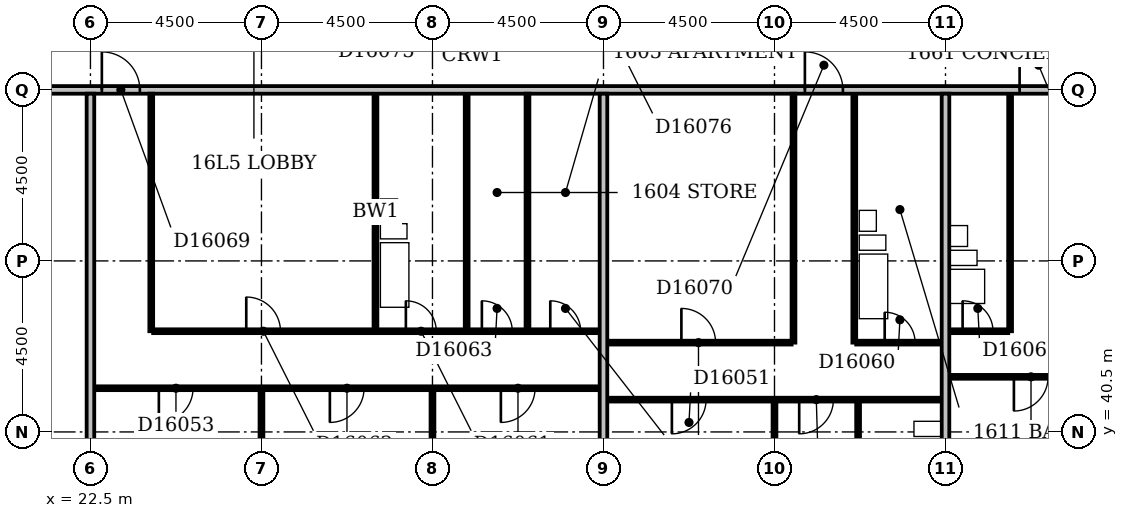
"""IFC4 building model, lengths in metres.
Left out: names, types, materials, properties, quantities, classifications, styles, units other than length and angle.
Written with IfcOpenShell. Run it as: python <this file> out.ifc"""

import sys

from ifc_helpers import new_model, si_unit, direction, frame, frame_2d, origin, place, context, subcontext, project, spatial, rectangle, extrude, element, fill, save


model = new_model("IFC4")
c1 = context("Model", 3, precision=1e-05, world=origin(), true_north=direction((0.0, 1.0)))
c2 = subcontext(c1, "Body", "Model", "MODEL_VIEW")
j1 = project(units=[si_unit("LENGTHUNIT", "METRE"), si_unit("PLANEANGLEUNIT", "RADIAN")], contexts=[c1])
p1 = place(None, origin())
s1 = spatial("IfcSite", under=j1, at=p1, CompositionType="ELEMENT")
p2 = place(p1, origin())
s2 = spatial("IfcBuilding", under=s1, at=p2, CompositionType="ELEMENT")
p3 = place(p2, frame((0.0, 0.0, 68.6)))
s3 = spatial("IfcBuildingStorey", under=s2, at=p3, CompositionType="ELEMENT", Elevation=68.6)
p4 = place(p3, frame((22.5, 36.6, 0.0), z_axis=(0.0, 0.0, 1.0), x_axis=(0.0, 1.0, 0.0)))
e1 = element("IfcWall", 1, at=p4, inside=s3, PredefinedType="PARTITIONING", context=c2, shape_type="SweptSolid", body=[
    extrude(rectangle(XDim=12.8, YDim=0.2, at=frame_2d((6.4, 0.0))), origin(), (0.0, 0.0, 1.0), 3.3),
])
p5 = place(p3, frame((27.0, 36.6, 0.0), z_axis=(0.0, 0.0, 1.0), x_axis=(0.0, 1.0, 0.0)))
e2 = element("IfcWall", 2, at=p5, inside=s3, PredefinedType="PARTITIONING", context=c2, shape_type="SweptSolid", body=[
    extrude(rectangle(XDim=5.0, YDim=0.1, at=frame_2d((2.5, 0.0))), origin(), (0.0, 0.0, 1.0), 2.6),
])
p6 = place(p3, frame((31.5, 36.6, 0.0), z_axis=(0.0, 0.0, 1.0), x_axis=(0.0, 1.0, 0.0)))
e3 = element("IfcWall", 3, at=p6, inside=s3, PredefinedType="PARTITIONING", context=c2, shape_type="SweptSolid", body=[
    extrude(rectangle(XDim=5.0, YDim=0.1, at=frame_2d((2.5, 0.0))), origin(), (0.0, 0.0, 1.0), 3.3),
])
p7 = place(p3, frame((36.0, 36.6, 0.0), z_axis=(0.0, 0.0, 1.0), x_axis=(0.0, 1.0, 0.0)))
e4 = element("IfcWall", 4, at=p7, inside=s3, PredefinedType="PARTITIONING", context=c2, shape_type="SweptSolid", body=[
    extrude(rectangle(XDim=12.8, YDim=0.2, at=frame_2d((6.4, 0.0))), origin(), (0.0, 0.0, 1.0), 2.4),
])
p8 = place(p3, frame((40.5, 36.6, 0.0), z_axis=(0.0, 0.0, 1.0), x_axis=(0.0, 1.0, 0.0)))
e5 = element("IfcWall", 5, at=p8, inside=s3, PredefinedType="PARTITIONING", context=c2, shape_type="SweptSolid", body=[
    extrude(rectangle(XDim=4.7, YDim=0.1, at=frame_2d((2.35, 0.0))), origin(), (0.0, 0.0, 1.0), 3.3),
])
p9 = place(p3, frame((45.0, 36.6, 0.0), z_axis=(0.0, 0.0, 1.0), x_axis=(0.0, 1.0, 0.0)))
e6 = element("IfcWall", 6, at=p9, inside=s3, PredefinedType="PARTITIONING", context=c2, shape_type="SweptSolid", body=[
    extrude(rectangle(XDim=12.8, YDim=0.2, at=frame_2d((6.4, 0.0))), origin(), (0.0, 0.0, 1.0), 2.6),
])
p10 = place(p3, frame((42.7, 38.45, 0.0), z_axis=(0.0, 0.0, 1.0), x_axis=(0.0, 1.0, 0.0)))
e7 = element("IfcWall", 7, at=p10, inside=s3, PredefinedType="PLUMBINGWALL", context=c2, shape_type="SweptSolid", body=[
    extrude(rectangle(XDim=2.85, YDim=0.1, at=frame_2d((1.425, 0.0))), origin(), (0.0, 0.0, 1.0), 3.3),
])
p11 = place(p10, frame((1.05, 0.0, 0.0)))
e8 = element("IfcOpeningElement", 8, at=p11, cuts=e7, PredefinedType="OPENING", context=c2, shape_type="SweptSolid", body=[
    extrude(rectangle(XDim=0.8, YDim=2.1, at=frame_2d((0.4, 1.05))), frame((0.0, 0.062, 0.0), z_axis=(0.0, -1.0, 0.0), x_axis=(1.0, 0.0, 0.0)), (0.0, 0.0, 1.0), 0.124),
])
p12 = place(p3, frame((36.1, 41.35, 0.0), z_axis=(0.0, 0.0, 1.0), x_axis=(1.0, 0.0, 0.0)))
e9 = element("IfcWall", 9, at=p12, inside=s3, PredefinedType="PARTITIONING", context=c2, shape_type="SweptSolid", body=[
    extrude(rectangle(XDim=8.8, YDim=0.1, at=frame_2d((4.4, 0.0))), origin(), (0.0, 0.0, 1.0), 3.3),
])
p13 = place(p12, frame((1.7, 0.0, 0.0)))
e10 = element("IfcOpeningElement", 10, at=p13, cuts=e9, PredefinedType="OPENING", context=c2, shape_type="SweptSolid", body=[
    extrude(rectangle(XDim=0.9, YDim=2.1, at=frame_2d((0.45, 1.05))), frame((0.0, 0.062, 0.0), z_axis=(0.0, -1.0, 0.0), x_axis=(1.0, 0.0, 0.0)), (0.0, 0.0, 1.0), 0.124),
])
p14 = place(p12, frame((5.05, 0.0, 0.0)))
e11 = element("IfcOpeningElement", 11, at=p14, cuts=e9, PredefinedType="OPENING", context=c2, shape_type="SweptSolid", body=[
    extrude(rectangle(XDim=0.9, YDim=2.1, at=frame_2d((0.45, 1.05))), frame((0.0, 0.062, 0.0), z_axis=(0.0, -1.0, 0.0), x_axis=(1.0, 0.0, 0.0)), (0.0, 0.0, 1.0), 0.124),
])
p15 = place(p3, frame((22.6, 41.65, 0.0), z_axis=(0.0, 0.0, 1.0), x_axis=(1.0, 0.0, 0.0)))
e12 = element("IfcWall", 12, at=p15, inside=s3, PredefinedType="PARTITIONING", context=c2, shape_type="SweptSolid", body=[
    extrude(rectangle(XDim=13.3, YDim=0.1, at=frame_2d((6.65, 0.0))), origin(), (0.0, 0.0, 1.0), 3.3),
])
p16 = place(p15, frame((1.7, 0.0, 0.0)))
e13 = element("IfcOpeningElement", 13, at=p16, cuts=e12, PredefinedType="OPENING", context=c2, shape_type="SweptSolid", body=[
    extrude(rectangle(XDim=0.9, YDim=2.1, at=frame_2d((0.45, 1.05))), frame((0.0, 0.062, 0.0), z_axis=(0.0, -1.0, 0.0), x_axis=(1.0, 0.0, 0.0)), (0.0, 0.0, 1.0), 0.124),
])
p17 = place(p15, frame((6.2, 0.0, 0.0)))
e14 = element("IfcOpeningElement", 14, at=p17, cuts=e12, PredefinedType="OPENING", context=c2, shape_type="SweptSolid", body=[
    extrude(rectangle(XDim=0.9, YDim=2.1, at=frame_2d((0.45, 1.05))), frame((0.0, 0.062, 0.0), z_axis=(0.0, -1.0, 0.0), x_axis=(1.0, 0.0, 0.0)), (0.0, 0.0, 1.0), 0.124),
])
p18 = place(p15, frame((10.7, 0.0, 0.0)))
e15 = element("IfcOpeningElement", 15, at=p18, cuts=e12, PredefinedType="OPENING", context=c2, shape_type="SweptSolid", body=[
    extrude(rectangle(XDim=0.9, YDim=2.1, at=frame_2d((0.45, 1.05))), frame((0.0, 0.062, 0.0), z_axis=(0.0, -1.0, 0.0), x_axis=(1.0, 0.0, 0.0)), (0.0, 0.0, 1.0), 0.124),
])
p19 = place(p3, frame((45.1, 41.95, 0.0), z_axis=(0.0, 0.0, 1.0), x_axis=(1.0, 0.0, 0.0)))
e16 = element("IfcWall", 16, at=p19, inside=s3, PredefinedType="PARTITIONING", context=c2, shape_type="SweptSolid", body=[
    extrude(rectangle(XDim=4.3, YDim=0.1, at=frame_2d((2.15, 0.0))), origin(), (0.0, 0.0, 1.0), 3.3),
])
p20 = place(p19, frame((1.7, 0.0, 0.0)))
e17 = element("IfcOpeningElement", 17, at=p20, cuts=e16, PredefinedType="OPENING", context=c2, shape_type="SweptSolid", body=[
    extrude(rectangle(XDim=0.9, YDim=2.1, at=frame_2d((0.45, 1.05))), frame((0.0, 0.062, 0.0), z_axis=(0.0, -1.0, 0.0), x_axis=(1.0, 0.0, 0.0)), (0.0, 0.0, 1.0), 0.124),
])
p21 = place(p3, frame((36.1, 42.85, 0.0), z_axis=(0.0, 0.0, 1.0), x_axis=(1.0, 0.0, 0.0)))
e18 = element("IfcWall", 18, at=p21, inside=s3, PredefinedType="PARTITIONING", context=c2, shape_type="SweptSolid", body=[
    extrude(rectangle(XDim=4.85, YDim=0.1, at=frame_2d((2.425, 0.0))), origin(), (0.0, 0.0, 1.0), 3.3),
])
p22 = place(p21, frame((1.95, 0.0, 0.0)))
e19 = element("IfcOpeningElement", 19, at=p22, cuts=e18, PredefinedType="OPENING", context=c2, shape_type="SweptSolid", body=[
    extrude(rectangle(XDim=0.9, YDim=2.1, at=frame_2d((0.45, 1.05))), frame((0.0, 0.062, 0.0), z_axis=(0.0, -1.0, 0.0), x_axis=(1.0, 0.0, 0.0)), (0.0, 0.0, 1.0), 0.124),
])
p23 = place(p3, frame((41.0, 42.85, 0.0), z_axis=(0.0, 0.0, 1.0), x_axis=(0.0, 1.0, 0.0)))
e20 = element("IfcWall", 20, at=p23, inside=s3, PredefinedType="PARTITIONING", context=c2, shape_type="SweptSolid", body=[
    extrude(rectangle(XDim=6.55, YDim=0.1, at=frame_2d((3.275, 0.0))), origin(), (0.0, 0.0, 1.0), 3.3),
])
p24 = place(p3, frame((42.6, 42.85, 0.0), z_axis=(0.0, 0.0, 1.0), x_axis=(0.0, 1.0, 0.0)))
e21 = element("IfcWall", 21, at=p24, inside=s3, PredefinedType="PLUMBINGWALL", context=c2, shape_type="SweptSolid", body=[
    extrude(rectangle(XDim=6.55, YDim=0.1, at=frame_2d((3.275, 0.0))), origin(), (0.0, 0.0, 1.0), 3.3),
])
p25 = place(p3, frame((42.65, 42.85, 0.0), z_axis=(0.0, 0.0, 1.0), x_axis=(1.0, 0.0, 0.0)))
e22 = element("IfcWall", 22, at=p25, inside=s3, PredefinedType="PARTITIONING", context=c2, shape_type="SweptSolid", body=[
    extrude(rectangle(XDim=2.25, YDim=0.1, at=frame_2d((1.125, 0.0))), origin(), (0.0, 0.0, 1.0), 3.3),
])
p26 = place(p25, frame((0.75, 0.0, 0.0)))
e23 = element("IfcOpeningElement", 23, at=p26, cuts=e22, PredefinedType="OPENING", context=c2, shape_type="SweptSolid", body=[
    extrude(rectangle(XDim=0.8, YDim=2.1, at=frame_2d((0.4, 1.05))), frame((0.0, 0.062, 0.0), z_axis=(0.0, -1.0, 0.0), x_axis=(1.0, 0.0, 0.0)), (0.0, 0.0, 1.0), 0.124),
])
p27 = place(p3, frame((24.1, 43.15, 0.0), z_axis=(0.0, 0.0, 1.0), x_axis=(0.0, 1.0, 0.0)))
e24 = element("IfcWall", 24, at=p27, inside=s3, PredefinedType="PARTITIONING", context=c2, shape_type="SweptSolid", body=[
    extrude(rectangle(XDim=6.25, YDim=0.1, at=frame_2d((3.125, 0.0))), origin(), (0.0, 0.0, 1.0), 3.3),
])
p28 = place(p3, frame((24.15, 43.15, 0.0), z_axis=(0.0, 0.0, 1.0), x_axis=(1.0, 0.0, 0.0)))
e25 = element("IfcWall", 25, at=p28, inside=s3, PredefinedType="PARTITIONING", context=c2, shape_type="SweptSolid", body=[
    extrude(rectangle(XDim=11.75, YDim=0.1, at=frame_2d((5.875, 0.0))), origin(), (0.0, 0.0, 1.0), 3.3),
])
p29 = place(p28, frame((6.65, 0.0, 0.0)))
e26 = element("IfcOpeningElement", 26, at=p29, cuts=e25, PredefinedType="OPENING", context=c2, shape_type="SweptSolid", body=[
    extrude(rectangle(XDim=0.8, YDim=2.1, at=frame_2d((0.4, 1.05))), frame((0.0, 0.062, 0.0), z_axis=(0.0, -1.0, 0.0), x_axis=(1.0, 0.0, 0.0)), (0.0, 0.0, 1.0), 0.124),
])
p30 = place(p28, frame((2.45, 0.0, 0.0)))
e27 = element("IfcOpeningElement", 27, at=p30, cuts=e25, PredefinedType="OPENING", context=c2, shape_type="SweptSolid", body=[
    extrude(rectangle(XDim=0.9, YDim=2.1, at=frame_2d((0.45, 1.05))), frame((0.0, 0.062, 0.0), z_axis=(0.0, -1.0, 0.0), x_axis=(1.0, 0.0, 0.0)), (0.0, 0.0, 1.0), 0.124),
])
p31 = place(p28, frame((8.65, 0.0, 0.0)))
e28 = element("IfcOpeningElement", 28, at=p31, cuts=e25, PredefinedType="OPENING", context=c2, shape_type="SweptSolid", body=[
    extrude(rectangle(XDim=0.8, YDim=2.1, at=frame_2d((0.4, 1.05))), frame((0.0, 0.062, 0.0), z_axis=(0.0, -1.0, 0.0), x_axis=(1.0, 0.0, 0.0)), (0.0, 0.0, 1.0), 0.124),
])
p32 = place(p28, frame((10.45, 0.0, 0.0)))
e29 = element("IfcOpeningElement", 29, at=p32, cuts=e25, PredefinedType="OPENING", context=c2, shape_type="SweptSolid", body=[
    extrude(rectangle(XDim=0.8, YDim=2.1, at=frame_2d((0.4, 1.05))), frame((0.0, 0.062, 0.0), z_axis=(0.0, -1.0, 0.0), x_axis=(1.0, 0.0, 0.0)), (0.0, 0.0, 1.0), 0.124),
])
p33 = place(p3, frame((45.1, 43.15, 0.0), z_axis=(0.0, 0.0, 1.0), x_axis=(1.0, 0.0, 0.0)))
e30 = element("IfcWall", 30, at=p33, inside=s3, PredefinedType="PARTITIONING", context=c2, shape_type="SweptSolid", body=[
    extrude(rectangle(XDim=1.55, YDim=0.1, at=frame_2d((0.775, 0.0))), origin(), (0.0, 0.0, 1.0), 3.3),
])
p34 = place(p33, frame((0.35, 0.0, 0.0)))
e31 = element("IfcOpeningElement", 31, at=p34, cuts=e30, PredefinedType="OPENING", context=c2, shape_type="SweptSolid", body=[
    extrude(rectangle(XDim=0.8, YDim=2.1, at=frame_2d((0.4, 1.05))), frame((0.0, 0.062, 0.0), z_axis=(0.0, -1.0, 0.0), x_axis=(1.0, 0.0, 0.0)), (0.0, 0.0, 1.0), 0.124),
])
p35 = place(p3, frame((46.7, 43.15, 0.0), z_axis=(0.0, 0.0, 1.0), x_axis=(0.0, 1.0, 0.0)))
e32 = element("IfcWall", 32, at=p35, inside=s3, PredefinedType="PLUMBINGWALL", context=c2, shape_type="SweptSolid", body=[
    extrude(rectangle(XDim=6.25, YDim=0.1, at=frame_2d((3.125, 0.0))), origin(), (0.0, 0.0, 1.0), 3.3),
])
for number, where, z_axis, x_axis in (
    (33, (30.0, 43.2, 0.0), (0.0, 0.0, 1.0), (0.0, 1.0, 0.0)),
    (34, (32.4, 43.2, 0.0), (0.0, 0.0, 1.0), (0.0, 1.0, 0.0)),
):
    element("IfcWall", number, at=place(p3, frame(where, z_axis=z_axis, x_axis=x_axis)), inside=s3, PredefinedType="PLUMBINGWALL", context=c2, shape_type="SweptSolid", body=[
        extrude(rectangle(XDim=6.2, YDim=0.1, at=frame_2d((3.1, 0.0))), origin(), (0.0, 0.0, 1.0), 3.3),
    ])
p36 = place(p3, frame((34.0, 43.2, 0.0), z_axis=(0.0, 0.0, 1.0), x_axis=(0.0, 1.0, 0.0)))
e35 = element("IfcWall", 35, at=p36, inside=s3, PredefinedType="PARTITIONING", context=c2, shape_type="SweptSolid", body=[
    extrude(rectangle(XDim=6.2, YDim=0.1, at=frame_2d((3.1, 0.0))), origin(), (0.0, 0.0, 1.0), 3.3),
])
p37 = place(p3, frame((9.1, 49.5, 0.0), z_axis=(0.0, 0.0, 1.0), x_axis=(1.0, 0.0, 0.0)))
e36 = element("IfcWall", 36, at=p37, inside=s3, PredefinedType="PARTITIONING", context=c2, shape_type="SweptSolid", body=[
    extrude(rectangle(XDim=57.8, YDim=0.2, at=frame_2d((28.9, 0.0))), origin(), (0.0, 0.0, 1.0), 3.3),
])
p38 = place(p37, frame((13.7, 0.0, 0.0)))
e37 = element("IfcOpeningElement", 37, at=p38, cuts=e36, PredefinedType="OPENING", context=c2, shape_type="SweptSolid", body=[
    extrude(rectangle(XDim=1.0, YDim=2.1, at=frame_2d((0.5, 1.05))), frame((0.0, 0.112, 0.0), z_axis=(0.0, -1.0, 0.0), x_axis=(1.0, 0.0, 0.0)), (0.0, 0.0, 1.0), 0.224),
])
p39 = place(p37, frame((32.2, 0.0, 0.0)))
e38 = element("IfcOpeningElement", 38, at=p39, cuts=e36, PredefinedType="OPENING", context=c2, shape_type="SweptSolid", body=[
    extrude(rectangle(XDim=1.0, YDim=2.1, at=frame_2d((0.5, 1.05))), frame((0.0, 0.112, 0.0), z_axis=(0.0, -1.0, 0.0), x_axis=(1.0, 0.0, 0.0)), (0.0, 0.0, 1.0), 0.224),
])
p40 = place(p37, frame((37.85, 0.0, 0.0)))
e39 = element("IfcOpeningElement", 39, at=p40, cuts=e36, PredefinedType="OPENING", context=c2, shape_type="SweptSolid", body=[
    extrude(rectangle(XDim=1.0, YDim=2.1, at=frame_2d((0.5, 1.05))), frame((0.0, 0.112, 0.0), z_axis=(0.0, -1.0, 0.0), x_axis=(1.0, 0.0, 0.0)), (0.0, 0.0, 1.0), 0.224),
])
p41 = place(p37, frame((45.7, 0.0, 0.0)))
e40 = element("IfcOpeningElement", 40, at=p41, cuts=e36, PredefinedType="OPENING", context=c2, shape_type="SweptSolid", body=[
    extrude(rectangle(XDim=1.0, YDim=2.1, at=frame_2d((0.5, 1.05))), frame((0.0, 0.112, 0.0), z_axis=(0.0, -1.0, 0.0), x_axis=(1.0, 0.0, 0.0)), (0.0, 0.0, 1.0), 0.224),
])
p42 = place(p37, frame((49.7, 0.0, 0.0)))
e41 = element("IfcOpeningElement", 41, at=p42, cuts=e36, PredefinedType="OPENING", context=c2, shape_type="SweptSolid", body=[
    extrude(rectangle(XDim=1.0, YDim=2.1, at=frame_2d((0.5, 1.05))), frame((0.0, 0.112, 0.0), z_axis=(0.0, -1.0, 0.0), x_axis=(1.0, 0.0, 0.0)), (0.0, 0.0, 1.0), 0.224),
])
p43 = place(p37, frame((8.4, 0.0, 0.0)))
e42 = element("IfcOpeningElement", 42, at=p43, cuts=e36, PredefinedType="OPENING", context=c2, shape_type="SweptSolid", body=[
    extrude(rectangle(XDim=0.9, YDim=2.1, at=frame_2d((0.45, 1.05))), frame((0.0, 0.112, 0.0), z_axis=(0.0, -1.0, 0.0), x_axis=(1.0, 0.0, 0.0)), (0.0, 0.0, 1.0), 0.224),
])
p44 = place(p13, frame((0.9, 0.0, 0.0), z_axis=(0.0, 0.0, 1.0), x_axis=(-1.0, 0.0, 0.0)))
e43 = element("IfcDoor", 43, at=p44, inside=s3, OperationType="SINGLE_SWING_RIGHT", PredefinedType="DOOR", context=c2, shape_type="SweptSolid", body=[
    extrude(rectangle(XDim=0.9, YDim=2.1, at=frame_2d((0.45, 1.05))), frame((0.0, 0.025, 0.0), z_axis=(0.0, -1.0, 0.0), x_axis=(1.0, 0.0, 0.0)), (0.0, 0.0, 1.0), 0.05),
])
fill(e10, e43)
p45 = place(p14, frame((0.9, 0.0, 0.0), z_axis=(0.0, 0.0, 1.0), x_axis=(-1.0, 0.0, 0.0)))
e44 = element("IfcDoor", 44, at=p45, inside=s3, OperationType="SINGLE_SWING_RIGHT", PredefinedType="DOOR", context=c2, shape_type="SweptSolid", body=[
    extrude(rectangle(XDim=0.9, YDim=2.1, at=frame_2d((0.45, 1.05))), frame((0.0, 0.025, 0.0), z_axis=(0.0, -1.0, 0.0), x_axis=(1.0, 0.0, 0.0)), (0.0, 0.0, 1.0), 0.05),
])
fill(e11, e44)
p46 = place(p16, frame((0.9, 0.0, 0.0), z_axis=(0.0, 0.0, 1.0), x_axis=(-1.0, 0.0, 0.0)))
e45 = element("IfcDoor", 45, at=p46, inside=s3, OperationType="SINGLE_SWING_RIGHT", PredefinedType="DOOR", context=c2, shape_type="SweptSolid", body=[
    extrude(rectangle(XDim=0.9, YDim=2.1, at=frame_2d((0.45, 1.05))), frame((0.0, 0.025, 0.0), z_axis=(0.0, -1.0, 0.0), x_axis=(1.0, 0.0, 0.0)), (0.0, 0.0, 1.0), 0.05),
])
fill(e13, e45)
p47 = place(p17, frame((0.9, 0.0, 0.0), z_axis=(0.0, 0.0, 1.0), x_axis=(-1.0, 0.0, 0.0)))
e46 = element("IfcDoor", 46, at=p47, inside=s3, OperationType="SINGLE_SWING_RIGHT", PredefinedType="DOOR", context=c2, shape_type="SweptSolid", body=[
    extrude(rectangle(XDim=0.9, YDim=2.1, at=frame_2d((0.45, 1.05))), frame((0.0, 0.025, 0.0), z_axis=(0.0, -1.0, 0.0), x_axis=(1.0, 0.0, 0.0)), (0.0, 0.0, 1.0), 0.05),
])
fill(e14, e46)
p48 = place(p18, frame((0.9, 0.0, 0.0), z_axis=(0.0, 0.0, 1.0), x_axis=(-1.0, 0.0, 0.0)))
e47 = element("IfcDoor", 47, at=p48, inside=s3, OperationType="SINGLE_SWING_RIGHT", PredefinedType="DOOR", context=c2, shape_type="SweptSolid", body=[
    extrude(rectangle(XDim=0.9, YDim=2.1, at=frame_2d((0.45, 1.05))), frame((0.0, 0.025, 0.0), z_axis=(0.0, -1.0, 0.0), x_axis=(1.0, 0.0, 0.0)), (0.0, 0.0, 1.0), 0.05),
])
fill(e15, e47)
p49 = place(p20, frame((0.9, 0.0, 0.0), z_axis=(0.0, 0.0, 1.0), x_axis=(-1.0, 0.0, 0.0)))
e48 = element("IfcDoor", 48, at=p49, inside=s3, OperationType="SINGLE_SWING_RIGHT", PredefinedType="DOOR", context=c2, shape_type="SweptSolid", body=[
    extrude(rectangle(XDim=0.9, YDim=2.1, at=frame_2d((0.45, 1.05))), frame((0.0, 0.025, 0.0), z_axis=(0.0, -1.0, 0.0), x_axis=(1.0, 0.0, 0.0)), (0.0, 0.0, 1.0), 0.05),
])
fill(e17, e48)
p50 = place(p22, origin())
e49 = element("IfcDoor", 49, at=p50, inside=s3, OperationType="SINGLE_SWING_LEFT", PredefinedType="DOOR", context=c2, shape_type="SweptSolid", body=[
    extrude(rectangle(XDim=0.9, YDim=2.1, at=frame_2d((0.45, 1.05))), frame((0.0, 0.025, 0.0), z_axis=(0.0, -1.0, 0.0), x_axis=(1.0, 0.0, 0.0)), (0.0, 0.0, 1.0), 0.05),
])
fill(e19, e49)
p51 = place(p26, origin())
e50 = element("IfcDoor", 50, at=p51, inside=s3, OperationType="SINGLE_SWING_LEFT", PredefinedType="DOOR", context=c2, shape_type="SweptSolid", body=[
    extrude(rectangle(XDim=0.8, YDim=2.1, at=frame_2d((0.4, 1.05))), frame((0.0, 0.025, 0.0), z_axis=(0.0, -1.0, 0.0), x_axis=(1.0, 0.0, 0.0)), (0.0, 0.0, 1.0), 0.05),
])
fill(e23, e50)
p52 = place(p29, origin())
e51 = element("IfcDoor", 51, at=p52, inside=s3, OperationType="SINGLE_SWING_LEFT", PredefinedType="DOOR", context=c2, shape_type="SweptSolid", body=[
    extrude(rectangle(XDim=0.8, YDim=2.1, at=frame_2d((0.4, 1.05))), frame((0.0, 0.025, 0.0), z_axis=(0.0, -1.0, 0.0), x_axis=(1.0, 0.0, 0.0)), (0.0, 0.0, 1.0), 0.05),
])
fill(e26, e51)
p53 = place(p30, origin())
e52 = element("IfcDoor", 52, at=p53, inside=s3, OperationType="SINGLE_SWING_LEFT", PredefinedType="DOOR", context=c2, shape_type="SweptSolid", body=[
    extrude(rectangle(XDim=0.9, YDim=2.1, at=frame_2d((0.45, 1.05))), frame((0.0, 0.025, 0.0), z_axis=(0.0, -1.0, 0.0), x_axis=(1.0, 0.0, 0.0)), (0.0, 0.0, 1.0), 0.05),
])
fill(e27, e52)
p54 = place(p31, origin())
e53 = element("IfcDoor", 53, at=p54, inside=s3, OperationType="SINGLE_SWING_LEFT", PredefinedType="DOOR", context=c2, shape_type="SweptSolid", body=[
    extrude(rectangle(XDim=0.8, YDim=2.1, at=frame_2d((0.4, 1.05))), frame((0.0, 0.025, 0.0), z_axis=(0.0, -1.0, 0.0), x_axis=(1.0, 0.0, 0.0)), (0.0, 0.0, 1.0), 0.05),
])
fill(e28, e53)
p55 = place(p32, origin())
e54 = element("IfcDoor", 54, at=p55, inside=s3, OperationType="SINGLE_SWING_LEFT", PredefinedType="DOOR", context=c2, shape_type="SweptSolid", body=[
    extrude(rectangle(XDim=0.8, YDim=2.1, at=frame_2d((0.4, 1.05))), frame((0.0, 0.025, 0.0), z_axis=(0.0, -1.0, 0.0), x_axis=(1.0, 0.0, 0.0)), (0.0, 0.0, 1.0), 0.05),
])
fill(e29, e54)
p56 = place(p34, origin())
e55 = element("IfcDoor", 55, at=p56, inside=s3, OperationType="SINGLE_SWING_LEFT", PredefinedType="DOOR", context=c2, shape_type="SweptSolid", body=[
    extrude(rectangle(XDim=0.8, YDim=2.1, at=frame_2d((0.4, 1.05))), frame((0.0, 0.025, 0.0), z_axis=(0.0, -1.0, 0.0), x_axis=(1.0, 0.0, 0.0)), (0.0, 0.0, 1.0), 0.05),
])
fill(e31, e55)
p57 = place(p38, origin())
e56 = element("IfcDoor", 56, at=p57, inside=s3, OperationType="SINGLE_SWING_LEFT", PredefinedType="DOOR", context=c2, shape_type="SweptSolid", body=[
    extrude(rectangle(XDim=1.0, YDim=2.1, at=frame_2d((0.5, 1.05))), frame((0.0, 0.025, 0.0), z_axis=(0.0, -1.0, 0.0), x_axis=(1.0, 0.0, 0.0)), (0.0, 0.0, 1.0), 0.05),
])
fill(e37, e56)
p58 = place(p39, origin())
e57 = element("IfcDoor", 57, at=p58, inside=s3, OperationType="SINGLE_SWING_LEFT", PredefinedType="DOOR", context=c2, shape_type="SweptSolid", body=[
    extrude(rectangle(XDim=1.0, YDim=2.1, at=frame_2d((0.5, 1.05))), frame((0.0, 0.025, 0.0), z_axis=(0.0, -1.0, 0.0), x_axis=(1.0, 0.0, 0.0)), (0.0, 0.0, 1.0), 0.05),
])
fill(e38, e57)
p59 = place(p40, origin())
e58 = element("IfcDoor", 58, at=p59, inside=s3, OperationType="SINGLE_SWING_LEFT", PredefinedType="DOOR", context=c2, shape_type="SweptSolid", body=[
    extrude(rectangle(XDim=1.0, YDim=2.1, at=frame_2d((0.5, 1.05))), frame((0.0, 0.025, 0.0), z_axis=(0.0, -1.0, 0.0), x_axis=(1.0, 0.0, 0.0)), (0.0, 0.0, 1.0), 0.05),
])
fill(e39, e58)
save(model, sys.argv[1])
